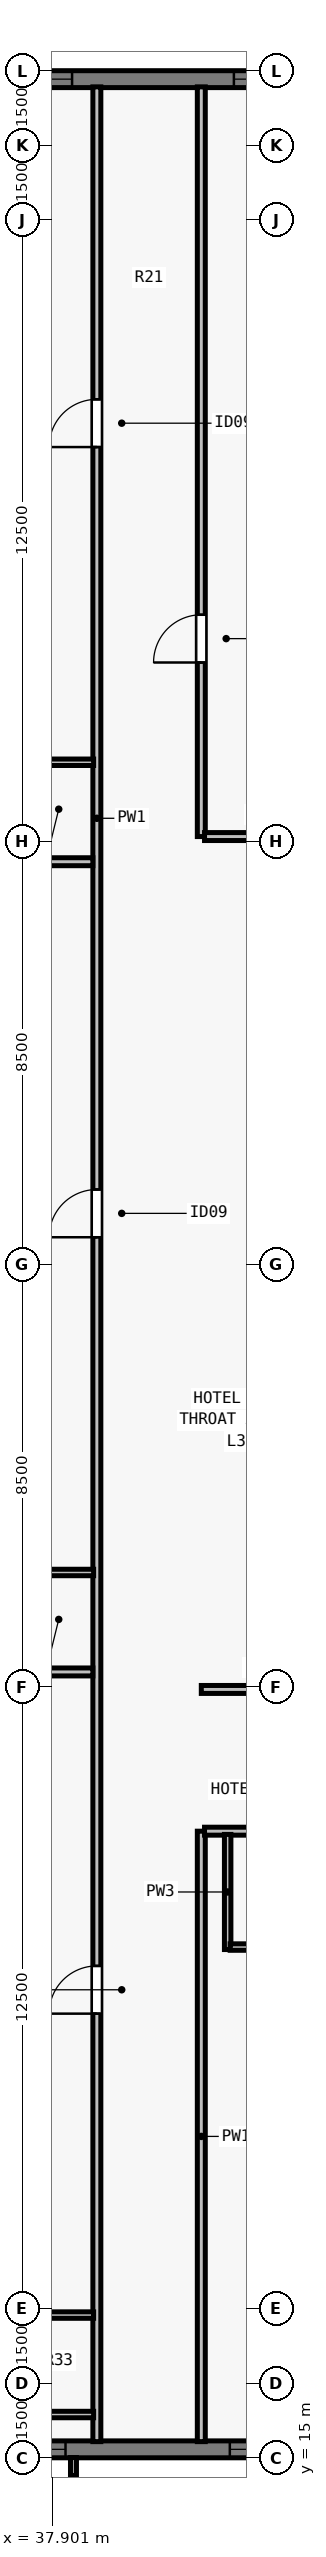
"""IFC4 building model, lengths in metres.
Left out: names, types, materials, properties, quantities, classifications, styles, units other than length and angle.
Written with IfcOpenShell. Run it as: python <this file> out.ifc"""

import sys

from ifc_helpers import new_model, si_unit, direction, frame, frame_2d, origin, place, context, subcontext, project, spatial, rectangle, extrude, element, fill, save


model = new_model("IFC4")
c1 = context("Model", 3, precision=1e-05, world=origin(), true_north=direction((0.0, 1.0)))
c2 = subcontext(c1, "Body", "Model", "MODEL_VIEW")
j1 = project(units=[si_unit("LENGTHUNIT", "METRE"), si_unit("PLANEANGLEUNIT", "RADIAN")], contexts=[c1])
p1 = place(None, origin())
s1 = spatial("IfcSite", under=j1, at=p1, CompositionType="ELEMENT")
p2 = place(p1, origin())
s2 = spatial("IfcBuilding", under=s1, at=p2, CompositionType="ELEMENT")
p3 = place(p2, frame((0.0, 0.0, 113.0)))
s3 = spatial("IfcBuildingStorey", under=s2, at=p3, CompositionType="ELEMENT", Elevation=113.0)
p4 = place(p3, frame((32.0, 62.83, 0.0), z_axis=(0.0, 0.0, 1.0), x_axis=(1.0, 0.0, 0.0)))
e1 = element("IfcWall", 1, at=p4, inside=s3, PredefinedType="SOLIDWALL", context=c2, shape_type="SweptSolid", body=[
    extrude(rectangle(XDim=39.682, YDim=0.34, at=frame_2d((19.841, 0.0))), origin(), (0.0, 0.0, 1.0), 3.28),
])
p5 = place(p4, frame((4.952, 0.0, 0.8)))
e2 = element("IfcOpeningElement", 2, at=p5, cuts=e1, PredefinedType="OPENING", context=c2, shape_type="SweptSolid", body=[
    extrude(rectangle(XDim=1.35, YDim=1.66, at=frame_2d((0.675, 0.83))), frame((0.0, 0.18, 0.0), z_axis=(0.0, -1.0, 0.0), x_axis=(1.0, 0.0, 0.0)), (0.0, 0.0, 1.0), 0.36),
])
p6 = place(p4, frame((9.555, 0.0, 0.8)))
e3 = element("IfcOpeningElement", 3, at=p6, cuts=e1, PredefinedType="OPENING", context=c2, shape_type="SweptSolid", body=[
    extrude(rectangle(XDim=1.75, YDim=1.66, at=frame_2d((0.875, 0.83))), frame((0.0, 0.18, 0.0), z_axis=(0.0, -1.0, 0.0), x_axis=(1.0, 0.0, 0.0)), (0.0, 0.0, 1.0), 0.36),
])
p7 = place(p4, frame((12.059, 0.0, 0.8)))
e4 = element("IfcOpeningElement", 4, at=p7, cuts=e1, PredefinedType="OPENING", context=c2, shape_type="SweptSolid", body=[
    extrude(rectangle(XDim=1.35, YDim=1.66, at=frame_2d((0.675, 0.83))), frame((0.0, 0.18, 0.0), z_axis=(0.0, -1.0, 0.0), x_axis=(1.0, 0.0, 0.0)), (0.0, 0.0, 1.0), 0.36),
])
p8 = place(p4, frame((19.166, 0.0, 0.8)))
e5 = element("IfcOpeningElement", 5, at=p8, cuts=e1, PredefinedType="OPENING", context=c2, shape_type="SweptSolid", body=[
    extrude(rectangle(XDim=1.35, YDim=1.66, at=frame_2d((0.675, 0.83))), frame((0.0, 0.18, 0.0), z_axis=(0.0, -1.0, 0.0), x_axis=(1.0, 0.0, 0.0)), (0.0, 0.0, 1.0), 0.36),
])
p9 = place(p4, frame((21.27, 0.0, 0.8)))
e6 = element("IfcOpeningElement", 6, at=p9, cuts=e1, PredefinedType="OPENING", context=c2, shape_type="SweptSolid", body=[
    extrude(rectangle(XDim=1.75, YDim=1.66, at=frame_2d((0.875, 0.83))), frame((0.0, 0.18, 0.0), z_axis=(0.0, -1.0, 0.0), x_axis=(1.0, 0.0, 0.0)), (0.0, 0.0, 1.0), 0.36),
])
p10 = place(p4, frame((26.273, 0.0, 0.8)))
e7 = element("IfcOpeningElement", 7, at=p10, cuts=e1, PredefinedType="OPENING", context=c2, shape_type="SweptSolid", body=[
    extrude(rectangle(XDim=1.35, YDim=1.66, at=frame_2d((0.675, 0.83))), frame((0.0, 0.18, 0.0), z_axis=(0.0, -1.0, 0.0), x_axis=(1.0, 0.0, 0.0)), (0.0, 0.0, 1.0), 0.36),
])
p11 = place(p4, frame((28.777, 0.0, 0.8)))
e8 = element("IfcOpeningElement", 8, at=p11, cuts=e1, PredefinedType="OPENING", context=c2, shape_type="SweptSolid", body=[
    extrude(rectangle(XDim=1.75, YDim=1.66, at=frame_2d((0.875, 0.83))), frame((0.0, 0.18, 0.0), z_axis=(0.0, -1.0, 0.0), x_axis=(1.0, 0.0, 0.0)), (0.0, 0.0, 1.0), 0.36),
])
p12 = place(p4, frame((33.83, 0.0, 0.8)))
e9 = element("IfcOpeningElement", 9, at=p12, cuts=e1, PredefinedType="OPENING", context=c2, shape_type="SweptSolid", body=[
    extrude(rectangle(XDim=1.35, YDim=1.66, at=frame_2d((0.675, 0.83))), frame((0.0, 0.18, 0.0), z_axis=(0.0, -1.0, 0.0), x_axis=(1.0, 0.0, 0.0)), (0.0, 0.0, 1.0), 0.36),
])
p13 = place(p3, frame((72.0, 15.17, 0.0), z_axis=(0.0, 0.0, 1.0), x_axis=(-1.0, 0.0, 0.0)))
e10 = element("IfcWall", 10, at=p13, inside=s3, PredefinedType="SOLIDWALL", context=c2, shape_type="SweptSolid", body=[
    extrude(rectangle(XDim=39.682, YDim=0.34, at=frame_2d((19.841, 0.0))), origin(), (0.0, 0.0, 1.0), 3.28),
])
p14 = place(p13, frame((4.952, 0.0, 0.8)))
e11 = element("IfcOpeningElement", 11, at=p14, cuts=e10, PredefinedType="OPENING", context=c2, shape_type="SweptSolid", body=[
    extrude(rectangle(XDim=1.35, YDim=1.66, at=frame_2d((0.675, 0.83))), frame((0.0, 0.18, 0.0), z_axis=(0.0, -1.0, 0.0), x_axis=(1.0, 0.0, 0.0)), (0.0, 0.0, 1.0), 0.36),
])
p15 = place(p13, frame((9.555, 0.0, 0.8)))
e12 = element("IfcOpeningElement", 12, at=p15, cuts=e10, PredefinedType="OPENING", context=c2, shape_type="SweptSolid", body=[
    extrude(rectangle(XDim=1.75, YDim=1.66, at=frame_2d((0.875, 0.83))), frame((0.0, 0.18, 0.0), z_axis=(0.0, -1.0, 0.0), x_axis=(1.0, 0.0, 0.0)), (0.0, 0.0, 1.0), 0.36),
])
p16 = place(p13, frame((12.059, 0.0, 0.8)))
e13 = element("IfcOpeningElement", 13, at=p16, cuts=e10, PredefinedType="OPENING", context=c2, shape_type="SweptSolid", body=[
    extrude(rectangle(XDim=1.35, YDim=1.66, at=frame_2d((0.675, 0.83))), frame((0.0, 0.18, 0.0), z_axis=(0.0, -1.0, 0.0), x_axis=(1.0, 0.0, 0.0)), (0.0, 0.0, 1.0), 0.36),
])
p17 = place(p13, frame((16.262, 0.0, 0.8)))
e14 = element("IfcOpeningElement", 14, at=p17, cuts=e10, PredefinedType="OPENING", context=c2, shape_type="SweptSolid", body=[
    extrude(rectangle(XDim=1.75, YDim=1.66, at=frame_2d((0.875, 0.83))), frame((0.0, 0.18, 0.0), z_axis=(0.0, -1.0, 0.0), x_axis=(1.0, 0.0, 0.0)), (0.0, 0.0, 1.0), 0.36),
])
p18 = place(p13, frame((18.716, 0.0, 0.8)))
e15 = element("IfcOpeningElement", 15, at=p18, cuts=e10, PredefinedType="OPENING", context=c2, shape_type="SweptSolid", body=[
    extrude(rectangle(XDim=1.35, YDim=1.66, at=frame_2d((0.675, 0.83))), frame((0.0, 0.18, 0.0), z_axis=(0.0, -1.0, 0.0), x_axis=(1.0, 0.0, 0.0)), (0.0, 0.0, 1.0), 0.36),
])
p19 = place(p13, frame((22.07, 0.0, 0.8)))
e16 = element("IfcOpeningElement", 16, at=p19, cuts=e10, PredefinedType="OPENING", context=c2, shape_type="SweptSolid", body=[
    extrude(rectangle(XDim=1.75, YDim=1.66, at=frame_2d((0.875, 0.83))), frame((0.0, 0.18, 0.0), z_axis=(0.0, -1.0, 0.0), x_axis=(1.0, 0.0, 0.0)), (0.0, 0.0, 1.0), 0.36),
])
p20 = place(p13, frame((26.273, 0.0, 0.8)))
e17 = element("IfcOpeningElement", 17, at=p20, cuts=e10, PredefinedType="OPENING", context=c2, shape_type="SweptSolid", body=[
    extrude(rectangle(XDim=1.35, YDim=1.66, at=frame_2d((0.675, 0.83))), frame((0.0, 0.18, 0.0), z_axis=(0.0, -1.0, 0.0), x_axis=(1.0, 0.0, 0.0)), (0.0, 0.0, 1.0), 0.36),
])
p21 = place(p13, frame((28.777, 0.0, 0.8)))
e18 = element("IfcOpeningElement", 18, at=p21, cuts=e10, PredefinedType="OPENING", context=c2, shape_type="SweptSolid", body=[
    extrude(rectangle(XDim=1.75, YDim=1.66, at=frame_2d((0.875, 0.83))), frame((0.0, 0.18, 0.0), z_axis=(0.0, -1.0, 0.0), x_axis=(1.0, 0.0, 0.0)), (0.0, 0.0, 1.0), 0.36),
])
p22 = place(p13, frame((33.83, 0.0, 0.8)))
e19 = element("IfcOpeningElement", 19, at=p22, cuts=e10, PredefinedType="OPENING", context=c2, shape_type="SweptSolid", body=[
    extrude(rectangle(XDim=1.35, YDim=1.66, at=frame_2d((0.675, 0.83))), frame((0.0, 0.18, 0.0), z_axis=(0.0, -1.0, 0.0), x_axis=(1.0, 0.0, 0.0)), (0.0, 0.0, 1.0), 0.36),
])
p23 = place(p3, frame((38.8, 15.325, 0.0), z_axis=(0.0, 0.0, 1.0), x_axis=(0.0, 1.0, 0.0)))
e20 = element("IfcWall", 20, at=p23, inside=s3, PredefinedType="PARTITIONING", context=c2, shape_type="SweptSolid", body=[
    extrude(rectangle(XDim=47.35, YDim=0.16, at=frame_2d((23.675, 0.0))), origin(), (0.0, 0.0, 1.0), 2.555),
])
p24 = place(p23, frame((8.606, 0.0, 0.0)))
e21 = element("IfcOpeningElement", 21, at=p24, cuts=e20, PredefinedType="OPENING", context=c2, shape_type="SweptSolid", body=[
    extrude(rectangle(XDim=0.96, YDim=2.15, at=frame_2d((0.48, 1.075))), frame((0.0, 0.09, 0.0), z_axis=(0.0, -1.0, 0.0), x_axis=(1.0, 0.0, 0.0)), (0.0, 0.0, 1.0), 0.18),
])
p25 = place(p23, frame((24.218, 0.0, 0.0)))
e22 = element("IfcOpeningElement", 22, at=p25, cuts=e20, PredefinedType="OPENING", context=c2, shape_type="SweptSolid", body=[
    extrude(rectangle(XDim=0.96, YDim=2.15, at=frame_2d((0.48, 1.075))), frame((0.0, 0.09, 0.0), z_axis=(0.0, -1.0, 0.0), x_axis=(1.0, 0.0, 0.0)), (0.0, 0.0, 1.0), 0.18),
])
p26 = place(p23, frame((40.107, 0.0, 0.0)))
e23 = element("IfcOpeningElement", 23, at=p26, cuts=e20, PredefinedType="OPENING", context=c2, shape_type="SweptSolid", body=[
    extrude(rectangle(XDim=0.96, YDim=2.15, at=frame_2d((0.48, 1.075))), frame((0.0, 0.09, 0.0), z_axis=(0.0, -1.0, 0.0), x_axis=(1.0, 0.0, 0.0)), (0.0, 0.0, 1.0), 0.18),
])
p27 = place(p3, frame((40.9, 15.325, 0.0), z_axis=(0.0, 0.0, 1.0), x_axis=(0.0, 1.0, 0.0)))
e24 = element("IfcWall", 24, at=p27, inside=s3, PredefinedType="PARTITIONING", context=c2, shape_type="SweptSolid", body=[
    extrude(rectangle(XDim=12.275, YDim=0.16, at=frame_2d((6.138, 0.0))), origin(), (0.0, 0.0, 1.0), 2.555),
])
p28 = place(p3, frame((40.9, 47.6, 0.0), z_axis=(0.0, 0.0, 1.0), x_axis=(0.0, 1.0, 0.0)))
e25 = element("IfcWall", 25, at=p28, inside=s3, PredefinedType="PARTITIONING", context=c2, shape_type="SweptSolid", body=[
    extrude(rectangle(XDim=15.075, YDim=0.16, at=frame_2d((7.538, 0.0))), origin(), (0.0, 0.0, 1.0), 2.555),
])
p29 = place(p28, frame((3.5, 0.0, 0.0)))
e26 = element("IfcOpeningElement", 26, at=p29, cuts=e25, PredefinedType="OPENING", context=c2, shape_type="SweptSolid", body=[
    extrude(rectangle(XDim=0.96, YDim=2.12, at=frame_2d((0.48, 1.06))), frame((0.0, 0.09, 0.0), z_axis=(0.0, -1.0, 0.0), x_axis=(1.0, 0.0, 0.0)), (0.0, 0.0, 1.0), 0.18),
])
p30 = place(p3, frame((40.9, 30.45, 0.0), z_axis=(0.0, 0.0, 1.0), x_axis=(1.0, 0.0, 0.0)))
e27 = element("IfcWall", 27, at=p30, inside=s3, PredefinedType="PARTITIONING", context=c2, shape_type="SweptSolid", body=[
    extrude(rectangle(XDim=2.335, YDim=0.16, at=frame_2d((1.167, 0.0))), origin(), (0.0, 0.0, 1.0), 3.28),
])
p31 = place(p3, frame((40.965, 47.6, 0.0), z_axis=(0.0, 0.0, 1.0), x_axis=(1.0, 0.0, 0.0)))
e28 = element("IfcWall", 28, at=p31, inside=s3, PredefinedType="PARTITIONING", context=c2, shape_type="SweptSolid", body=[
    extrude(rectangle(XDim=2.27, YDim=0.16, at=frame_2d((1.135, 0.0))), origin(), (0.0, 0.0, 1.0), 3.28),
])
p32 = place(p3, frame((40.965, 27.6, 0.0), z_axis=(0.0, 0.0, 1.0), x_axis=(1.0, 0.0, 0.0)))
e29 = element("IfcWall", 29, at=p32, inside=s3, PredefinedType="PARTITIONING", context=c2, shape_type="SweptSolid", body=[
    extrude(rectangle(XDim=22.07, YDim=0.16, at=frame_2d((11.035, 0.0))), origin(), (0.0, 0.0, 1.0), 3.28),
])
p33 = place(p32, frame((6.085, 0.0, 0.0)))
e30 = element("IfcOpeningElement", 30, at=p33, cuts=e29, PredefinedType="OPENING", context=c2, shape_type="SweptSolid", body=[
    extrude(rectangle(XDim=0.96, YDim=2.15, at=frame_2d((0.48, 1.075))), frame((0.0, 0.09, 0.0), z_axis=(0.0, -1.0, 0.0), x_axis=(1.0, 0.0, 0.0)), (0.0, 0.0, 1.0), 0.18),
])
p34 = place(p32, frame((16.88, 0.0, 0.0)))
e31 = element("IfcOpeningElement", 31, at=p34, cuts=e29, PredefinedType="OPENING", context=c2, shape_type="SweptSolid", body=[
    extrude(rectangle(XDim=0.96, YDim=2.15, at=frame_2d((0.48, 1.075))), frame((0.0, 0.09, 0.0), z_axis=(0.0, -1.0, 0.0), x_axis=(1.0, 0.0, 0.0)), (0.0, 0.0, 1.0), 0.18),
])
p35 = place(p3, frame((41.43, 25.22, 0.0), z_axis=(0.0, 0.0, 1.0), x_axis=(0.0, 1.0, 0.0)))
e32 = element("IfcWall", 32, at=p35, inside=s3, PredefinedType="PLUMBINGWALL", context=c2, shape_type="SweptSolid", body=[
    extrude(rectangle(XDim=2.315, YDim=0.13, at=frame_2d((1.157, 0.0))), origin(), (0.0, 0.0, 1.0), 3.28),
])
p36 = place(p3, frame((41.48, 25.27, 0.0), z_axis=(0.0, 0.0, 1.0), x_axis=(1.0, 0.0, 0.0)))
e33 = element("IfcWall", 33, at=p36, inside=s3, PredefinedType="PLUMBINGWALL", context=c2, shape_type="SweptSolid", body=[
    extrude(rectangle(XDim=1.9, YDim=0.13, at=frame_2d((0.95, 0.0))), origin(), (0.0, 0.0, 1.0), 3.28),
])
p37 = place(p36, frame((0.54, 0.0, 0.0)))
e34 = element("IfcOpeningElement", 34, at=p37, cuts=e33, PredefinedType="OPENING", context=c2, shape_type="SweptSolid", body=[
    extrude(rectangle(XDim=0.82, YDim=2.1, at=frame_2d((0.41, 1.05))), frame((0.0, 0.075, 0.0), z_axis=(0.0, -1.0, 0.0), x_axis=(1.0, 0.0, 0.0)), (0.0, 0.0, 1.0), 0.15),
])
for number, where, z_axis, x_axis in (
    (35, (36.42, 15.87, 0.0), (0.0, 0.0, 1.0), (1.0, 0.0, 0.0)),
    (36, (36.42, 17.87, 0.0), (0.0, 0.0, 1.0), (1.0, 0.0, 0.0)),
):
    element("IfcWall", number, at=place(p3, frame(where, z_axis=z_axis, x_axis=x_axis)), inside=s3, PredefinedType="PLUMBINGWALL", context=c2, shape_type="SweptSolid", body=[
        extrude(rectangle(XDim=2.315, YDim=0.13, at=frame_2d((1.158, 0.0))), origin(), (0.0, 0.0, 1.0), 3.28),
    ])
p38 = place(p3, frame((28.325, 30.802, 0.0), z_axis=(0.0, 0.0, 1.0), x_axis=(1.0, 0.0, 0.0)))
e37 = element("IfcWall", 37, at=p38, inside=s3, PredefinedType="PARTITIONING", context=c2, shape_type="SweptSolid", body=[
    extrude(rectangle(XDim=10.395, YDim=0.16, at=frame_2d((5.198, 0.0))), origin(), (0.0, 0.0, 1.0), 3.28),
])
p39 = place(p3, frame((36.42, 32.802, 0.0), z_axis=(0.0, 0.0, 1.0), x_axis=(1.0, 0.0, 0.0)))
e38 = element("IfcWall", 38, at=p39, inside=s3, PredefinedType="PLUMBINGWALL", context=c2, shape_type="SweptSolid", body=[
    extrude(rectangle(XDim=2.315, YDim=0.13, at=frame_2d((1.158, 0.0))), origin(), (0.0, 0.0, 1.0), 3.28),
])
p40 = place(p3, frame((28.27, 47.094, 0.0), z_axis=(0.0, 0.0, 1.0), x_axis=(1.0, 0.0, 0.0)))
e39 = element("IfcWall", 39, at=p40, inside=s3, PredefinedType="PARTITIONING", context=c2, shape_type="SweptSolid", body=[
    extrude(rectangle(XDim=10.45, YDim=0.16, at=frame_2d((5.225, 0.0))), origin(), (0.0, 0.0, 1.0), 3.28),
])
p41 = place(p3, frame((36.42, 49.094, 0.0), z_axis=(0.0, 0.0, 1.0), x_axis=(1.0, 0.0, 0.0)))
e40 = element("IfcWall", 40, at=p41, inside=s3, PredefinedType="PLUMBINGWALL", context=c2, shape_type="SweptSolid", body=[
    extrude(rectangle(XDim=2.315, YDim=0.13, at=frame_2d((1.158, 0.0))), origin(), (0.0, 0.0, 1.0), 3.28),
])
p42 = place(p5, origin())
e41 = element("IfcWindow", 41, at=p42, inside=s3, PartitioningType="SINGLE_PANEL", PredefinedType="WINDOW", context=c2, shape_type="SweptSolid", body=[
    extrude(rectangle(XDim=1.35, YDim=1.66, at=frame_2d((0.675, 0.83))), frame((0.0, -0.05, 0.0), z_axis=(0.0, -1.0, 0.0), x_axis=(1.0, 0.0, 0.0)), (0.0, 0.0, 1.0), 0.06),
])
fill(e2, e41)
p43 = place(p6, origin())
e42 = element("IfcWindow", 42, at=p43, inside=s3, PartitioningType="SINGLE_PANEL", PredefinedType="WINDOW", context=c2, shape_type="SweptSolid", body=[
    extrude(rectangle(XDim=1.75, YDim=1.66, at=frame_2d((0.875, 0.83))), frame((0.0, -0.05, 0.0), z_axis=(0.0, -1.0, 0.0), x_axis=(1.0, 0.0, 0.0)), (0.0, 0.0, 1.0), 0.06),
])
fill(e3, e42)
p44 = place(p21, origin())
e43 = element("IfcWindow", 43, at=p44, inside=s3, PartitioningType="SINGLE_PANEL", PredefinedType="WINDOW", context=c2, shape_type="SweptSolid", body=[
    extrude(rectangle(XDim=1.75, YDim=1.66, at=frame_2d((0.875, 0.83))), frame((0.0, -0.05, 0.0), z_axis=(0.0, -1.0, 0.0), x_axis=(1.0, 0.0, 0.0)), (0.0, 0.0, 1.0), 0.06),
])
fill(e18, e43)
p45 = place(p22, origin())
e44 = element("IfcWindow", 44, at=p45, inside=s3, PartitioningType="SINGLE_PANEL", PredefinedType="WINDOW", context=c2, shape_type="SweptSolid", body=[
    extrude(rectangle(XDim=1.35, YDim=1.66, at=frame_2d((0.675, 0.83))), frame((0.0, -0.05, 0.0), z_axis=(0.0, -1.0, 0.0), x_axis=(1.0, 0.0, 0.0)), (0.0, 0.0, 1.0), 0.06),
])
fill(e19, e44)
p46 = place(p29, origin())
e45 = element("IfcDoor", 45, at=p46, inside=s3, OperationType="SINGLE_SWING_LEFT", PredefinedType="DOOR", context=c2, shape_type="SweptSolid", body=[
    extrude(rectangle(XDim=0.96, YDim=2.12, at=frame_2d((0.48, 1.06))), frame((0.0, 0.025, 0.0), z_axis=(0.0, -1.0, 0.0), x_axis=(1.0, 0.0, 0.0)), (0.0, 0.0, 1.0), 0.05),
])
fill(e26, e45)
p47 = place(p24, origin())
e46 = element("IfcDoor", 46, at=p47, inside=s3, OperationType="SINGLE_SWING_LEFT", PredefinedType="DOOR", context=c2, shape_type="SweptSolid", body=[
    extrude(rectangle(XDim=0.96, YDim=2.15, at=frame_2d((0.48, 1.075))), frame((0.0, 0.025, 0.0), z_axis=(0.0, -1.0, 0.0), x_axis=(1.0, 0.0, 0.0)), (0.0, 0.0, 1.0), 0.05),
])
fill(e21, e46)
p48 = place(p25, origin())
e47 = element("IfcDoor", 47, at=p48, inside=s3, OperationType="SINGLE_SWING_LEFT", PredefinedType="DOOR", context=c2, shape_type="SweptSolid", body=[
    extrude(rectangle(XDim=0.96, YDim=2.15, at=frame_2d((0.48, 1.075))), frame((0.0, 0.025, 0.0), z_axis=(0.0, -1.0, 0.0), x_axis=(1.0, 0.0, 0.0)), (0.0, 0.0, 1.0), 0.05),
])
fill(e22, e47)
p49 = place(p26, origin())
e48 = element("IfcDoor", 48, at=p49, inside=s3, OperationType="SINGLE_SWING_LEFT", PredefinedType="DOOR", context=c2, shape_type="SweptSolid", body=[
    extrude(rectangle(XDim=0.96, YDim=2.15, at=frame_2d((0.48, 1.075))), frame((0.0, 0.025, 0.0), z_axis=(0.0, -1.0, 0.0), x_axis=(1.0, 0.0, 0.0)), (0.0, 0.0, 1.0), 0.05),
])
fill(e23, e48)
save(model, sys.argv[1])
